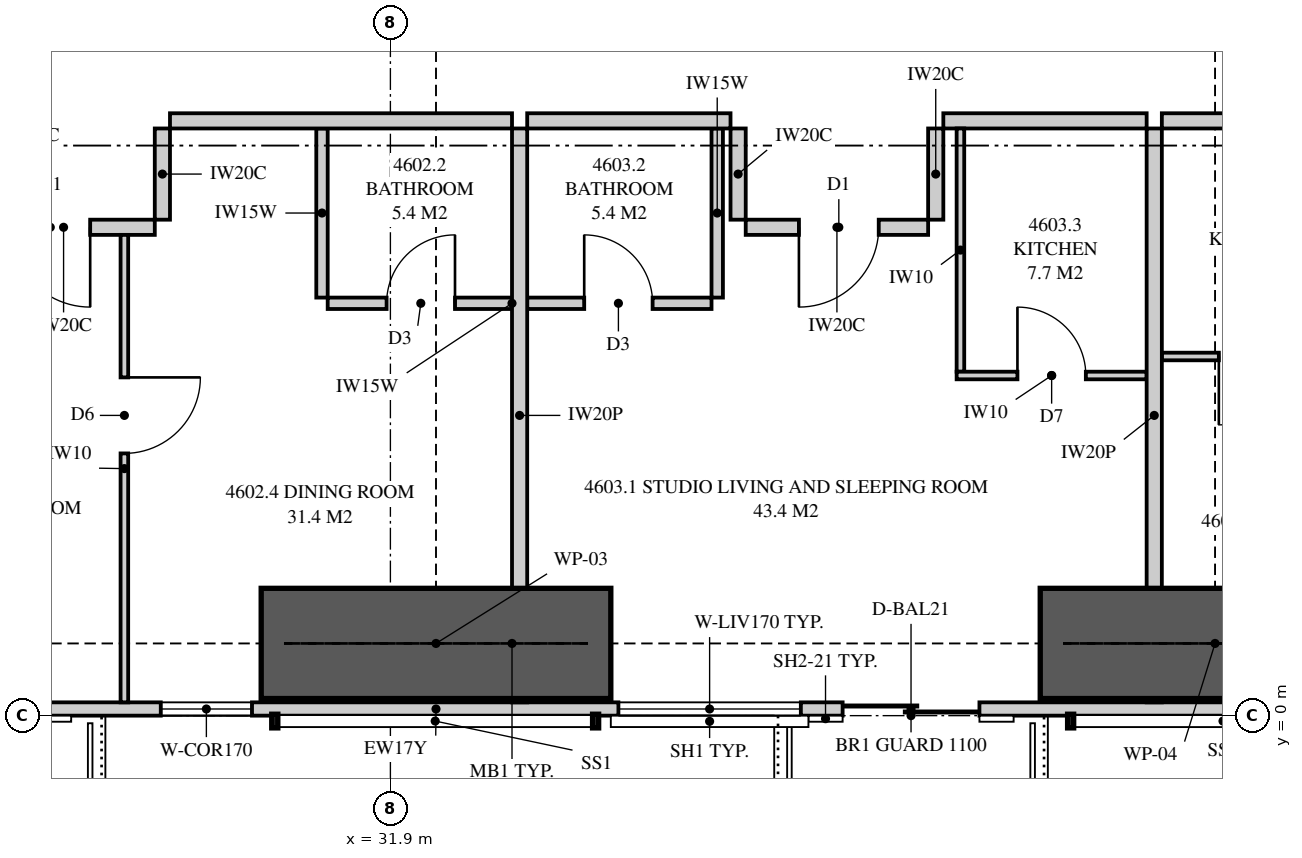
"""IFC4 building model, lengths in metres.
Left out: names, types, materials, properties, quantities, classifications, styles, units other than length and angle.
Written with IfcOpenShell. Run it as: python <this file> out.ifc"""

import sys

from ifc_helpers import new_model, si_unit, direction, frame, frame_2d, origin, place, context, subcontext, project, spatial, polyline, rectangle, outline, extrude, element, fill, save


model = new_model("IFC4")
c1 = context("Model", 3, precision=1e-05, world=origin(), true_north=direction((0.0, 1.0)))
c2 = subcontext(c1, "Body", "Model", "MODEL_VIEW")
j1 = project(units=[si_unit("LENGTHUNIT", "METRE"), si_unit("PLANEANGLEUNIT", "RADIAN")], contexts=[c1])
p1 = place(None, origin())
s1 = spatial("IfcSite", under=j1, at=p1, CompositionType="ELEMENT")
p2 = place(p1, origin())
s2 = spatial("IfcBuilding", under=s1, at=p2, CompositionType="ELEMENT")
p3 = place(p2, frame((0.0, 0.0, 171.1)))
s3 = spatial("IfcBuildingStorey", under=s2, at=p3, CompositionType="ELEMENT", Elevation=171.1)
p4 = place(p3, frame((15.051, 0.087, 0.0), z_axis=(0.0, 0.0, 1.0), x_axis=(1.0, 0.0, 0.0)))
e1 = element("IfcWall", 1, at=p4, inside=s3, PredefinedType="SOLIDWALL", context=c2, shape_type="SweptSolid", body=[
    extrude(outline(polyline([(0.0, 0.0), (34.897, 0.0), (34.897, 3.11), (27.91, 3.11), (27.91, 2.15), (27.836, 2.15), (27.836, 3.11), (27.699, 3.11), (27.699, 2.15), (7.199, 2.15), (7.199, 3.11), (7.062, 3.11), (7.062, 2.15), (6.987, 2.15), (6.987, 3.11), (0.0, 3.11), (0.0, 0.0)])), frame((0.0, 0.087, 0.0), z_axis=(0.0, -1.0, 0.0), x_axis=(1.0, 0.0, 0.0)), (0.0, 0.0, 1.0), 0.175),
])
p5 = place(p4, frame((1.824, 0.0, 0.4)))
e2 = element("IfcOpeningElement", 2, at=p5, cuts=e1, PredefinedType="OPENING", context=c2, shape_type="SweptSolid", body=[
    extrude(rectangle(XDim=2.4, YDim=1.7, at=frame_2d((1.2, 0.85))), frame((0.0, 0.097, 0.0), z_axis=(0.0, -1.0, 0.0), x_axis=(1.0, 0.0, 0.0)), (0.0, 0.0, 1.0), 0.195),
])
p6 = place(p4, frame((10.399, 0.0, 0.0)))
e3 = element("IfcOpeningElement", 3, at=p6, cuts=e1, PredefinedType="OPENING", context=c2, shape_type="SweptSolid", body=[
    extrude(rectangle(XDim=1.8, YDim=2.1, at=frame_2d((0.9, 1.05))), frame((0.0, 0.097, 0.0), z_axis=(0.0, -1.0, 0.0), x_axis=(1.0, 0.0, 0.0)), (0.0, 0.0, 1.0), 0.195),
])
p7 = place(p4, frame((13.827, 0.0, 0.4)))
e4 = element("IfcOpeningElement", 4, at=p7, cuts=e1, PredefinedType="OPENING", context=c2, shape_type="SweptSolid", body=[
    extrude(rectangle(XDim=1.2, YDim=1.7, at=frame_2d((0.6, 0.85))), frame((0.0, 0.097, 0.0), z_axis=(0.0, -1.0, 0.0), x_axis=(1.0, 0.0, 0.0)), (0.0, 0.0, 1.0), 0.195),
])
p8 = place(p4, frame((22.799, 0.0, 0.0)))
e5 = element("IfcOpeningElement", 5, at=p8, cuts=e1, PredefinedType="OPENING", context=c2, shape_type="SweptSolid", body=[
    extrude(rectangle(XDim=1.8, YDim=2.1, at=frame_2d((0.9, 1.05))), frame((0.0, 0.097, 0.0), z_axis=(0.0, -1.0, 0.0), x_axis=(1.0, 0.0, 0.0)), (0.0, 0.0, 1.0), 0.195),
])
p9 = place(p4, frame((19.849, 0.0, 0.4)))
e6 = element("IfcOpeningElement", 6, at=p9, cuts=e1, PredefinedType="OPENING", context=c2, shape_type="SweptSolid", body=[
    extrude(rectangle(XDim=2.4, YDim=1.7, at=frame_2d((1.2, 0.85))), frame((0.0, 0.097, 0.0), z_axis=(0.0, -1.0, 0.0), x_axis=(1.0, 0.0, 0.0)), (0.0, 0.0, 1.0), 0.195),
])
p10 = place(p4, frame((30.108, 0.0, 0.4)))
e7 = element("IfcOpeningElement", 7, at=p10, cuts=e1, PredefinedType="OPENING", context=c2, shape_type="SweptSolid", body=[
    extrude(rectangle(XDim=2.4, YDim=1.7, at=frame_2d((1.2, 0.85))), frame((0.0, 0.097, 0.0), z_axis=(0.0, -1.0, 0.0), x_axis=(1.0, 0.0, 0.0)), (0.0, 0.0, 1.0), 0.195),
])
p11 = place(p3, frame((33.6, 0.175, 0.0), z_axis=(0.0, 0.0, 1.0), x_axis=(0.0, 1.0, 0.0)))
e8 = element("IfcWall", 8, at=p11, inside=s3, PredefinedType="PARTITIONING", context=c2, shape_type="SweptSolid", body=[
    extrude(outline(polyline([(0.529, 2.15), (0.0, 2.15), (0.0, 0.0), (0.529, 0.0), (0.529, 0.625), (1.021, 0.625), (1.021, 0.0), (7.55, 0.0), (7.55, 3.11), (1.685, 3.11), (1.685, 2.15), (1.021, 2.15), (1.021, 1.525), (0.529, 1.525), (0.529, 2.15)])), frame((0.0, 0.1, 0.0), z_axis=(0.0, -1.0, 0.0), x_axis=(1.0, 0.0, 0.0)), (0.0, 0.0, 1.0), 0.2),
])
p12 = place(p3, frame((31.075, 5.425, 0.0), z_axis=(0.0, 0.0, 1.0), x_axis=(1.0, 0.0, 0.0)))
e9 = element("IfcWall", 9, at=p12, inside=s3, PredefinedType="PLUMBINGWALL", context=c2, shape_type="SweptSolid", body=[
    extrude(outline(polyline([(0.0, 0.0), (2.425, 0.0), (2.425, 3.11), (1.737, 3.11), (1.737, 2.541), (1.113, 2.541), (1.113, 3.11), (0.0, 3.11), (0.0, 0.0)])), frame((0.0, 0.075, 0.0), z_axis=(0.0, -1.0, 0.0), x_axis=(1.0, 0.0, 0.0)), (0.0, 0.0, 1.0), 0.15),
])
p13 = place(p12, frame((0.775, 0.0, 0.0)))
e10 = element("IfcOpeningElement", 10, at=p13, cuts=e9, PredefinedType="OPENING", context=c2, shape_type="SweptSolid", body=[
    extrude(rectangle(XDim=0.9, YDim=2.1, at=frame_2d((0.45, 1.05))), frame((0.0, 0.085, 0.0), z_axis=(0.0, -1.0, 0.0), x_axis=(1.0, 0.0, 0.0)), (0.0, 0.0, 1.0), 0.17),
])
p14 = place(p3, frame((31.0, 5.5, 0.0), z_axis=(0.0, 0.0, 1.0), x_axis=(0.0, 1.0, 0.0)))
e11 = element("IfcWall", 11, at=p14, inside=s3, PredefinedType="PLUMBINGWALL", context=c2, shape_type="SweptSolid", body=[
    extrude(rectangle(XDim=2.225, YDim=0.15, at=frame_2d((1.113, 0.0))), origin(), (0.0, 0.0, 1.0), 3.11),
])
p15 = place(p3, frame((28.4, 0.175, 0.0), z_axis=(0.0, 0.0, 1.0), x_axis=(0.0, 1.0, 0.0)))
e12 = element("IfcWall", 12, at=p15, inside=s3, PredefinedType="PARTITIONING", context=c2, shape_type="SweptSolid", body=[
    extrude(outline(polyline([(0.0, 0.0), (6.15, 0.0), (6.15, 3.11), (1.635, 3.11), (1.635, 2.15), (0.0, 2.15), (0.0, 3.11), (0.0, 0.0)])), frame((0.0, 0.05, 0.0), z_axis=(0.0, -1.0, 0.0), x_axis=(1.0, 0.0, 0.0)), (0.0, 0.0, 1.0), 0.1),
])
p16 = place(p15, frame((3.275, 0.0, 0.0)))
e13 = element("IfcOpeningElement", 13, at=p16, cuts=e12, PredefinedType="OPENING", context=c2, shape_type="SweptSolid", body=[
    extrude(rectangle(XDim=1.0, YDim=2.1, at=frame_2d((0.5, 1.05))), frame((0.0, 0.06, 0.0), z_axis=(0.0, -1.0, 0.0), x_axis=(1.0, 0.0, 0.0)), (0.0, 0.0, 1.0), 0.12),
])
p17 = place(p3, frame((41.95, 0.175, 0.0), z_axis=(0.0, 0.0, 1.0), x_axis=(0.0, 1.0, 0.0)))
e14 = element("IfcWall", 14, at=p17, inside=s3, PredefinedType="PARTITIONING", context=c2, shape_type="SweptSolid", body=[
    extrude(outline(polyline([(0.529, 2.15), (0.0, 2.15), (0.0, 0.0), (0.529, 0.0), (0.529, 0.876), (1.021, 0.876), (1.021, 0.0), (7.55, 0.0), (7.55, 3.11), (1.685, 3.11), (1.685, 2.15), (1.021, 2.15), (1.021, 1.273), (0.529, 1.273), (0.529, 2.15)])), frame((0.0, 0.1, 0.0), z_axis=(0.0, -1.0, 0.0), x_axis=(1.0, 0.0, 0.0)), (0.0, 0.0, 1.0), 0.2),
])
p18 = place(p3, frame((33.7, 7.825, 0.0), z_axis=(0.0, 0.0, 1.0), x_axis=(1.0, 0.0, 0.0)))
e15 = element("IfcWall", 15, at=p18, inside=s3, PredefinedType="PARTITIONING", context=c2, shape_type="SweptSolid", body=[
    extrude(rectangle(XDim=2.675, YDim=0.2, at=frame_2d((1.337, 0.0))), origin(), (0.0, 0.0, 1.0), 3.11),
])
p19 = place(p3, frame((33.7, 5.425, 0.0), z_axis=(0.0, 0.0, 1.0), x_axis=(1.0, 0.0, 0.0)))
e16 = element("IfcWall", 16, at=p19, inside=s3, PredefinedType="PLUMBINGWALL", context=c2, shape_type="SweptSolid", body=[
    extrude(rectangle(XDim=2.425, YDim=0.15, at=frame_2d((1.212, 0.0))), origin(), (0.0, 0.0, 1.0), 3.11),
])
p20 = place(p19, frame((0.75, 0.0, 0.0)))
e17 = element("IfcOpeningElement", 17, at=p20, cuts=e16, PredefinedType="OPENING", context=c2, shape_type="SweptSolid", body=[
    extrude(rectangle(XDim=0.9, YDim=2.1, at=frame_2d((0.45, 1.05))), frame((0.0, 0.085, 0.0), z_axis=(0.0, -1.0, 0.0), x_axis=(1.0, 0.0, 0.0)), (0.0, 0.0, 1.0), 0.17),
])
p21 = place(p3, frame((36.2, 5.5, 0.0), z_axis=(0.0, 0.0, 1.0), x_axis=(0.0, 1.0, 0.0)))
e18 = element("IfcWall", 18, at=p21, inside=s3, PredefinedType="PLUMBINGWALL", context=c2, shape_type="SweptSolid", body=[
    extrude(rectangle(XDim=2.225, YDim=0.15, at=frame_2d((1.113, 0.0))), origin(), (0.0, 0.0, 1.0), 3.11),
])
p22 = place(p3, frame((42.05, 7.825, 0.0), z_axis=(0.0, 0.0, 1.0), x_axis=(1.0, 0.0, 0.0)))
e19 = element("IfcWall", 19, at=p22, inside=s3, PredefinedType="PARTITIONING", context=c2, shape_type="SweptSolid", body=[
    extrude(outline(polyline([(0.0, 0.0), (3.9, 0.0), (3.9, 3.11), (1.037, 3.11), (1.037, 2.541), (0.363, 2.541), (0.363, 3.11), (0.0, 3.11), (0.0, 0.0)])), frame((0.0, 0.1, 0.0), z_axis=(0.0, -1.0, 0.0), x_axis=(1.0, 0.0, 0.0)), (0.0, 0.0, 1.0), 0.2),
])
p23 = place(p22, frame((2.7, 0.0, 0.0)))
e20 = element("IfcOpeningElement", 20, at=p23, cuts=e19, PredefinedType="OPENING", context=c2, shape_type="SweptSolid", body=[
    extrude(rectangle(XDim=1.05, YDim=2.2, at=frame_2d((0.525, 1.1))), frame((0.0, 0.11, 0.0), z_axis=(0.0, -1.0, 0.0), x_axis=(1.0, 0.0, 0.0)), (0.0, 0.0, 1.0), 0.22),
])
p24 = place(p3, frame((42.05, 4.725, 0.0), z_axis=(0.0, 0.0, 1.0), x_axis=(1.0, 0.0, 0.0)))
e21 = element("IfcWall", 21, at=p24, inside=s3, PredefinedType="PARTITIONING", context=c2, shape_type="SweptSolid", body=[
    extrude(outline(polyline([(0.0, 0.0), (2.35, 0.0), (2.35, 3.11), (0.987, 3.11), (0.987, 2.541), (0.413, 2.541), (0.413, 3.11), (0.0, 3.11), (0.0, 0.0)])), frame((0.0, 0.05, 0.0), z_axis=(0.0, -1.0, 0.0), x_axis=(1.0, 0.0, 0.0)), (0.0, 0.0, 1.0), 0.1),
])
p25 = place(p24, frame((0.75, 0.0, 0.0)))
e22 = element("IfcOpeningElement", 22, at=p25, cuts=e21, PredefinedType="OPENING", context=c2, shape_type="SweptSolid", body=[
    extrude(rectangle(XDim=0.9, YDim=2.1, at=frame_2d((0.45, 1.05))), frame((0.0, 0.06, 0.0), z_axis=(0.0, -1.0, 0.0), x_axis=(1.0, 0.0, 0.0)), (0.0, 0.0, 1.0), 0.12),
])
p26 = place(p3, frame((29.0, 7.825, 0.0), z_axis=(0.0, 0.0, 1.0), x_axis=(1.0, 0.0, 0.0)))
e23 = element("IfcWall", 23, at=p26, inside=s3, PredefinedType="PARTITIONING", context=c2, shape_type="SweptSolid", body=[
    extrude(outline(polyline([(0.0, 0.0), (4.5, 0.0), (4.5, 3.11), (3.837, 3.11), (3.837, 2.541), (3.163, 2.541), (3.163, 3.11), (0.0, 3.11), (0.0, 0.0)])), frame((0.0, 0.1, 0.0), z_axis=(0.0, -1.0, 0.0), x_axis=(1.0, 0.0, 0.0)), (0.0, 0.0, 1.0), 0.2),
])
p27 = place(p3, frame((26.4, 6.425, 0.0), z_axis=(0.0, 0.0, 1.0), x_axis=(1.0, 0.0, 0.0)))
e24 = element("IfcWall", 24, at=p27, inside=s3, PredefinedType="PARTITIONING", context=c2, shape_type="SweptSolid", body=[
    extrude(rectangle(XDim=2.4, YDim=0.2, at=frame_2d((1.2, 0.0))), origin(), (0.0, 0.0, 1.0), 3.11),
])
p28 = place(p27, frame((0.5, 0.0, 0.0)))
e25 = element("IfcOpeningElement", 25, at=p28, cuts=e24, PredefinedType="OPENING", context=c2, shape_type="SweptSolid", body=[
    extrude(rectangle(XDim=1.05, YDim=2.2, at=frame_2d((0.525, 1.1))), frame((0.0, 0.11, 0.0), z_axis=(0.0, -1.0, 0.0), x_axis=(1.0, 0.0, 0.0)), (0.0, 0.0, 1.0), 0.22),
])
p29 = place(p3, frame((28.9, 7.725, 0.0), z_axis=(0.0, 0.0, 1.0), x_axis=(0.0, -1.0, 0.0)))
e26 = element("IfcWall", 26, at=p29, inside=s3, PredefinedType="PARTITIONING", context=c2, shape_type="SweptSolid", body=[
    extrude(rectangle(XDim=1.2, YDim=0.2, at=frame_2d((0.6, 0.0))), origin(), (0.0, 0.0, 1.0), 3.11),
])
p30 = place(p3, frame((39.175, 7.825, 0.0), z_axis=(0.0, 0.0, 1.0), x_axis=(1.0, 0.0, 0.0)))
e27 = element("IfcWall", 27, at=p30, inside=s3, PredefinedType="PARTITIONING", context=c2, shape_type="SweptSolid", body=[
    extrude(rectangle(XDim=2.675, YDim=0.2, at=frame_2d((1.337, 0.0))), origin(), (0.0, 0.0, 1.0), 3.11),
])
p31 = place(p3, frame((36.575, 6.425, 0.0), z_axis=(0.0, 0.0, 1.0), x_axis=(1.0, 0.0, 0.0)))
e28 = element("IfcWall", 28, at=p31, inside=s3, PredefinedType="PARTITIONING", context=c2, shape_type="SweptSolid", body=[
    extrude(rectangle(XDim=2.4, YDim=0.2, at=frame_2d((1.2, 0.0))), origin(), (0.0, 0.0, 1.0), 3.11),
])
p32 = place(p31, frame((0.7, 0.0, 0.0)))
e29 = element("IfcOpeningElement", 29, at=p32, cuts=e28, PredefinedType="OPENING", context=c2, shape_type="SweptSolid", body=[
    extrude(rectangle(XDim=1.05, YDim=2.2, at=frame_2d((0.525, 1.1))), frame((0.0, 0.11, 0.0), z_axis=(0.0, -1.0, 0.0), x_axis=(1.0, 0.0, 0.0)), (0.0, 0.0, 1.0), 0.22),
])
for number, where, z_axis, x_axis in (
    (30, (36.475, 7.725, 0.0), (0.0, 0.0, 1.0), (0.0, -1.0, 0.0)),
    (31, (39.075, 7.725, 0.0), (0.0, 0.0, 1.0), (0.0, -1.0, 0.0)),
):
    element("IfcWall", number, at=place(p3, frame(where, z_axis=z_axis, x_axis=x_axis)), inside=s3, PredefinedType="PARTITIONING", context=c2, shape_type="SweptSolid", body=[
        extrude(rectangle(XDim=1.2, YDim=0.2, at=frame_2d((0.6, 0.0))), origin(), (0.0, 0.0, 1.0), 3.11),
    ])
p33 = place(p3, frame((41.85, 4.475, 0.0), z_axis=(0.0, 0.0, 1.0), x_axis=(-1.0, 0.0, 0.0)))
e32 = element("IfcWall", 32, at=p33, inside=s3, PredefinedType="PARTITIONING", context=c2, shape_type="SweptSolid", body=[
    extrude(rectangle(XDim=2.5, YDim=0.1, at=frame_2d((1.25, 0.0))), origin(), (0.0, 0.0, 1.0), 3.11),
])
p34 = place(p33, frame((0.8, 0.0, 0.0)))
e33 = element("IfcOpeningElement", 33, at=p34, cuts=e32, PredefinedType="OPENING", context=c2, shape_type="SweptSolid", body=[
    extrude(rectangle(XDim=0.9, YDim=2.1, at=frame_2d((0.45, 1.05))), frame((0.0, 0.06, 0.0), z_axis=(0.0, -1.0, 0.0), x_axis=(1.0, 0.0, 0.0)), (0.0, 0.0, 1.0), 0.12),
])
p35 = place(p3, frame((39.4, 7.725, 0.0), z_axis=(0.0, 0.0, 1.0), x_axis=(0.0, -1.0, 0.0)))
e34 = element("IfcWall", 34, at=p35, inside=s3, PredefinedType="PARTITIONING", context=c2, shape_type="SweptSolid", body=[
    extrude(rectangle(XDim=3.2, YDim=0.1, at=frame_2d((1.6, 0.0))), origin(), (0.0, 0.0, 1.0), 3.11),
])
for number, where, z_axis, x_axis in (
    (35, (30.2, 0.95, 0.0), (0.0, 0.0, 1.0), (1.0, 0.0, 0.0)),
    (36, (40.45, 0.95, 0.0), (0.0, 0.0, 1.0), (1.0, 0.0, 0.0)),
):
    element("IfcWall", number, at=place(p3, frame(where, z_axis=z_axis, x_axis=x_axis)), inside=s3, PredefinedType="SHEAR", context=c2, shape_type="SweptSolid", body=[
        extrude(rectangle(XDim=4.6, YDim=1.45, at=frame_2d((2.3, 0.0))), origin(), (0.0, 0.0, 1.0), 3.35),
    ])
p36 = place(p7, origin())
e37 = element("IfcWindow", 37, at=p36, inside=s3, PartitioningType="SINGLE_PANEL", PredefinedType="WINDOW", context=c2, shape_type="SweptSolid", body=[
    extrude(rectangle(XDim=1.2, YDim=1.7, at=frame_2d((0.6, 0.85))), frame((0.0, 0.03, 0.0), z_axis=(0.0, -1.0, 0.0), x_axis=(1.0, 0.0, 0.0)), (0.0, 0.0, 1.0), 0.06),
])
fill(e4, e37)
p37 = place(p8, origin())
e38 = element("IfcDoor", 38, at=p37, inside=s3, OperationType="SLIDING_TO_LEFT", PredefinedType="DOOR", context=c2, shape_type="SweptSolid", body=[
    extrude(rectangle(XDim=1.8, YDim=2.1, at=frame_2d((0.9, 1.05))), frame((0.0, 0.025, 0.0), z_axis=(0.0, -1.0, 0.0), x_axis=(1.0, 0.0, 0.0)), (0.0, 0.0, 1.0), 0.05),
])
fill(e5, e38)
p38 = place(p9, origin())
e39 = element("IfcWindow", 39, at=p38, inside=s3, PartitioningType="SINGLE_PANEL", PredefinedType="WINDOW", context=c2, shape_type="SweptSolid", body=[
    extrude(rectangle(XDim=2.4, YDim=1.7, at=frame_2d((1.2, 0.85))), frame((0.0, 0.03, 0.0), z_axis=(0.0, -1.0, 0.0), x_axis=(1.0, 0.0, 0.0)), (0.0, 0.0, 1.0), 0.06),
])
fill(e6, e39)
p39 = place(p28, frame((1.05, 0.0, 0.0), z_axis=(0.0, 0.0, 1.0), x_axis=(-1.0, 0.0, 0.0)))
e40 = element("IfcDoor", 40, at=p39, inside=s3, OperationType="SINGLE_SWING_LEFT", PredefinedType="DOOR", context=c2, shape_type="SweptSolid", body=[
    extrude(rectangle(XDim=1.05, YDim=2.2, at=frame_2d((0.525, 1.1))), frame((0.0, 0.025, 0.0), z_axis=(0.0, -1.0, 0.0), x_axis=(1.0, 0.0, 0.0)), (0.0, 0.0, 1.0), 0.05),
])
fill(e25, e40)
p40 = place(p13, origin())
e41 = element("IfcDoor", 41, at=p40, inside=s3, OperationType="SINGLE_SWING_RIGHT", PredefinedType="DOOR", context=c2, shape_type="SweptSolid", body=[
    extrude(rectangle(XDim=0.9, YDim=2.1, at=frame_2d((0.45, 1.05))), frame((0.0, 0.025, 0.0), z_axis=(0.0, -1.0, 0.0), x_axis=(1.0, 0.0, 0.0)), (0.0, 0.0, 1.0), 0.05),
])
fill(e10, e41)
p41 = place(p16, frame((1.0, 0.0, 0.0), z_axis=(0.0, 0.0, 1.0), x_axis=(-1.0, 0.0, 0.0)))
e42 = element("IfcDoor", 42, at=p41, inside=s3, OperationType="SINGLE_SWING_LEFT", PredefinedType="DOOR", context=c2, shape_type="SweptSolid", body=[
    extrude(rectangle(XDim=1.0, YDim=2.1, at=frame_2d((0.5, 1.05))), frame((0.0, 0.025, 0.0), z_axis=(0.0, -1.0, 0.0), x_axis=(1.0, 0.0, 0.0)), (0.0, 0.0, 1.0), 0.05),
])
fill(e13, e42)
p42 = place(p32, frame((1.05, 0.0, 0.0), z_axis=(0.0, 0.0, 1.0), x_axis=(-1.0, 0.0, 0.0)))
e43 = element("IfcDoor", 43, at=p42, inside=s3, OperationType="SINGLE_SWING_RIGHT", PredefinedType="DOOR", context=c2, shape_type="SweptSolid", body=[
    extrude(rectangle(XDim=1.05, YDim=2.2, at=frame_2d((0.525, 1.1))), frame((0.0, 0.025, 0.0), z_axis=(0.0, -1.0, 0.0), x_axis=(1.0, 0.0, 0.0)), (0.0, 0.0, 1.0), 0.05),
])
fill(e29, e43)
p43 = place(p20, origin())
e44 = element("IfcDoor", 44, at=p43, inside=s3, OperationType="SINGLE_SWING_LEFT", PredefinedType="DOOR", context=c2, shape_type="SweptSolid", body=[
    extrude(rectangle(XDim=0.9, YDim=2.1, at=frame_2d((0.45, 1.05))), frame((0.0, 0.025, 0.0), z_axis=(0.0, -1.0, 0.0), x_axis=(1.0, 0.0, 0.0)), (0.0, 0.0, 1.0), 0.05),
])
fill(e17, e44)
p44 = place(p25, frame((0.9, 0.0, 0.0), z_axis=(0.0, 0.0, 1.0), x_axis=(-1.0, 0.0, 0.0)))
e45 = element("IfcDoor", 45, at=p44, inside=s3, OperationType="SINGLE_SWING_RIGHT", PredefinedType="DOOR", context=c2, shape_type="SweptSolid", body=[
    extrude(rectangle(XDim=0.9, YDim=2.1, at=frame_2d((0.45, 1.05))), frame((0.0, 0.025, 0.0), z_axis=(0.0, -1.0, 0.0), x_axis=(1.0, 0.0, 0.0)), (0.0, 0.0, 1.0), 0.05),
])
fill(e22, e45)
p45 = place(p34, frame((0.9, 0.0, 0.0), z_axis=(0.0, 0.0, 1.0), x_axis=(-1.0, 0.0, 0.0)))
e46 = element("IfcDoor", 46, at=p45, inside=s3, OperationType="SINGLE_SWING_LEFT", PredefinedType="DOOR", context=c2, shape_type="SweptSolid", body=[
    extrude(rectangle(XDim=0.9, YDim=2.1, at=frame_2d((0.45, 1.05))), frame((0.0, 0.025, 0.0), z_axis=(0.0, -1.0, 0.0), x_axis=(1.0, 0.0, 0.0)), (0.0, 0.0, 1.0), 0.05),
])
fill(e33, e46)
save(model, sys.argv[1])
